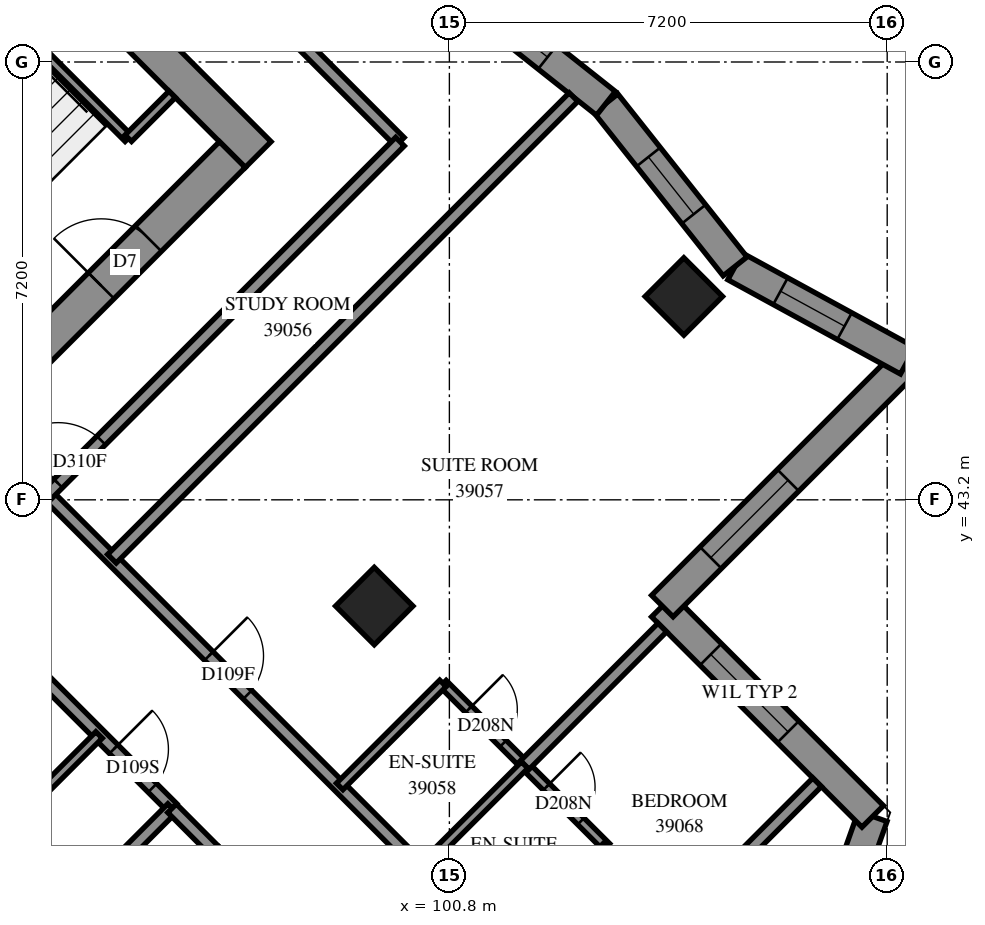
"""IFC4 building model, lengths in metres.
Left out: names, types, materials, properties, quantities, classifications, styles, units other than length and angle.
Written with IfcOpenShell. Run it as: python <this file> out.ifc"""

import sys

from ifc_helpers import new_model, si_unit, direction, frame, frame_2d, origin, origin_2d, place, context, subcontext, project, spatial, polyline, rectangle, outline, extrude, element, fill, save


model = new_model("IFC4")
c1 = context("Model", 3, precision=1e-05, world=origin(), true_north=direction((0.0, 1.0)))
c2 = subcontext(c1, "Body", "Model", "MODEL_VIEW")
j1 = project(units=[si_unit("LENGTHUNIT", "METRE"), si_unit("PLANEANGLEUNIT", "RADIAN")], contexts=[c1])
p1 = place(None, origin())
s1 = spatial("IfcSite", under=j1, at=p1, CompositionType="ELEMENT")
p2 = place(p1, origin())
s2 = spatial("IfcBuilding", under=s1, at=p2, CompositionType="ELEMENT")
p3 = place(p2, frame((0.0, 0.0, 145.6)))
s3 = spatial("IfcBuildingStorey", under=s2, at=p3, CompositionType="ELEMENT", Elevation=145.6)
for number, where, z_axis, x_axis in (
    (1, (104.656, 46.544, 0.0), (0.0, 0.0, 1.0), (0.707, -0.707, 0.0)),
    (2, (99.565, 41.453, 0.0), (0.0, 0.0, 1.0), (0.707, -0.707, 0.0)),
):
    element("IfcColumn", number, at=place(p3, frame(where, z_axis=z_axis, x_axis=x_axis)), inside=s3, PredefinedType="COLUMN", context=c2, shape_type="SweptSolid", body=[
        extrude(rectangle(XDim=0.9, YDim=0.9, at=origin_2d()), origin(), (0.0, 0.0, 1.0), 3.1),
    ])
p4 = place(p3, frame((86.625, 59.908, -0.3), z_axis=(0.0, 0.0, 1.0), x_axis=(0.7071067812, -0.7071067812, 0.0)))
e3 = element("IfcWall", 3, at=p4, inside=s3, PredefinedType="SHEAR", context=c2, shape_type="SweptSolid", body=[
    extrude(rectangle(XDim=15.6, YDim=0.6, at=frame_2d((7.8, 0.0))), origin(), (0.0, 0.0, 1.0), 2.7),
])
p5 = place(p4, frame((10.6, 0.0, 0.3)))
e4 = element("IfcOpeningElement", 4, at=p5, cuts=e3, PredefinedType="OPENING", context=c2, shape_type="SweptSolid", body=[
    extrude(rectangle(XDim=0.8, YDim=2.1, at=frame_2d((0.4, 1.05))), frame((0.0, 0.31, 0.0), z_axis=(0.0, -1.0, 0.0), x_axis=(1.0, 0.0, 0.0)), (0.0, 0.0, 1.0), 0.62),
])
p6 = place(p3, frame((87.049, 38.695, -0.3), z_axis=(0.0, 0.0, 1.0), x_axis=(0.7071067812, 0.7071067812, 0.0)))
e5 = element("IfcWall", 5, at=p6, inside=s3, PredefinedType="SHEAR", context=c2, shape_type="SweptSolid", body=[
    extrude(rectangle(XDim=14.4, YDim=0.6, at=frame_2d((7.2, 0.0))), origin(), (0.0, 0.0, 1.0), 2.7),
])
p7 = place(p6, frame((4.55, 0.0, 0.3)))
e6 = element("IfcOpeningElement", 6, at=p7, cuts=e5, PredefinedType="OPENING", context=c2, shape_type="SweptSolid", body=[
    extrude(rectangle(XDim=1.1, YDim=2.1, at=frame_2d((0.55, 1.05))), frame((0.0, 0.31, 0.0), z_axis=(0.0, -1.0, 0.0), x_axis=(1.0, 0.0, 0.0)), (0.0, 0.0, 1.0), 0.62),
])
p8 = place(p6, frame((11.35, 0.0, 0.3)))
e7 = element("IfcOpeningElement", 7, at=p8, cuts=e5, PredefinedType="OPENING", context=c2, shape_type="SweptSolid", body=[
    extrude(rectangle(XDim=1.1, YDim=2.1, at=frame_2d((0.55, 1.05))), frame((0.0, 0.31, 0.0), z_axis=(0.0, -1.0, 0.0), x_axis=(1.0, 0.0, 0.0)), (0.0, 0.0, 1.0), 0.62),
])
p9 = place(p3, frame((105.98, 32.984, 0.0), z_axis=(0.0, 0.0, 1.0), x_axis=(0.3349755344, 0.9422268259, 0.0)))
e8 = element("IfcWall", 8, at=p9, inside=s3, PredefinedType="SOLIDWALL", context=c2, shape_type="SweptSolid", body=[
    extrude(outline(polyline([(-0.114, -0.25), (5.475, -0.25), (5.16, 0.25), (0.114, 0.25), (-0.114, -0.25)])), origin(), (0.0, 0.0, 1.0), 3.1),
])
p10 = place(p9, frame((1.158, 0.0, 0.45)))
e9 = element("IfcOpeningElement", 9, at=p10, cuts=e8, PredefinedType="OPENING", context=c2, shape_type="SweptSolid", body=[
    extrude(rectangle(XDim=1.2, YDim=2.5, at=frame_2d((0.6, 1.25))), frame((0.0, 0.26, 0.0), z_axis=(0.0, -1.0, 0.0), x_axis=(1.0, 0.0, 0.0)), (0.0, 0.0, 1.0), 0.52),
])
p11 = place(p9, frame((3.48, 0.0, 0.45)))
e10 = element("IfcOpeningElement", 10, at=p11, cuts=e8, PredefinedType="OPENING", context=c2, shape_type="SweptSolid", body=[
    extrude(rectangle(XDim=1.2, YDim=2.5, at=frame_2d((0.6, 1.25))), frame((0.0, 0.26, 0.0), z_axis=(0.0, -1.0, 0.0), x_axis=(1.0, 0.0, 0.0)), (0.0, 0.0, 1.0), 0.52),
])
p12 = place(p3, frame((107.761, 37.994, 0.0), z_axis=(0.0, 0.0, 1.0), x_axis=(-0.7071170016, 0.7070965606, 0.0)))
e11 = element("IfcWall", 11, at=p12, inside=s3, PredefinedType="SOLIDWALL", context=c2, shape_type="SweptSolid", body=[
    extrude(outline(polyline([(-0.158, -0.25), (4.642, -0.25), (5.142, 0.25), (0.158, 0.25), (-0.158, -0.25)])), origin(), (0.0, 0.0, 1.0), 3.1),
])
p13 = place(p12, frame((1.967, 0.0, 0.6)))
e12 = element("IfcOpeningElement", 12, at=p13, cuts=e11, PredefinedType="OPENING", context=c2, shape_type="SweptSolid", body=[
    extrude(rectangle(XDim=1.8, YDim=1.9, at=frame_2d((0.9, 0.95))), frame((0.0, 0.26, 0.0), z_axis=(0.0, -1.0, 0.0), x_axis=(1.0, 0.0, 0.0)), (0.0, 0.0, 1.0), 0.52),
])
p14 = place(p3, frame((104.302, 41.453, 0.0), z_axis=(0.0, 0.0, 1.0), x_axis=(0.7071155421, 0.7070980202, 0.0)))
e13 = element("IfcWall", 13, at=p14, inside=s3, PredefinedType="SOLIDWALL", context=c2, shape_type="SweptSolid", body=[
    extrude(outline(polyline([(0.25, -0.25), (6.041, -0.25), (5.373, 0.25), (-0.25, 0.25), (0.25, -0.25)])), origin(), (0.0, 0.0, 1.0), 3.1),
])
p15 = place(p14, frame((1.125, 0.0, 0.6)))
e14 = element("IfcOpeningElement", 14, at=p15, cuts=e13, PredefinedType="OPENING", context=c2, shape_type="SweptSolid", body=[
    extrude(rectangle(XDim=1.8, YDim=1.9, at=frame_2d((0.9, 0.95))), frame((0.0, 0.26, 0.0), z_axis=(0.0, -1.0, 0.0), x_axis=(1.0, 0.0, 0.0)), (0.0, 0.0, 1.0), 0.52),
])
p16 = place(p3, frame((108.338, 45.489, 0.0), z_axis=(0.0, 0.0, 1.0), x_axis=(-0.8776615504, 0.4792809227, 0.0)))
e15 = element("IfcWall", 15, at=p16, inside=s3, PredefinedType="SOLIDWALL", context=c2, shape_type="SweptSolid", body=[
    extrude(outline(polyline([(-0.334, -0.25), (3.184, -0.25), (3.286, 0.25), (0.334, 0.25), (-0.334, -0.25)])), origin(), (0.0, 0.0, 1.0), 3.1),
])
p17 = place(p16, frame((1.184, 0.0, 0.45)))
e16 = element("IfcOpeningElement", 16, at=p17, cuts=e15, PredefinedType="OPENING", context=c2, shape_type="SweptSolid", body=[
    extrude(rectangle(XDim=1.2, YDim=2.5, at=frame_2d((0.6, 1.25))), frame((0.0, 0.26, 0.0), z_axis=(0.0, -1.0, 0.0), x_axis=(1.0, 0.0, 0.0)), (0.0, 0.0, 1.0), 0.52),
])
p18 = place(p3, frame((105.499, 47.039, 0.0), z_axis=(0.0, 0.0, 1.0), x_axis=(-0.6210369057, 0.7837813227, 0.0)))
e17 = element("IfcWall", 17, at=p18, inside=s3, PredefinedType="SOLIDWALL", context=c2, shape_type="SweptSolid", body=[
    extrude(outline(polyline([(0.051, -0.25), (3.449, -0.25), (3.391, 0.25), (-0.051, 0.25), (0.051, -0.25)])), origin(), (0.0, 0.0, 1.0), 3.1),
])
p19 = place(p18, frame((1.095, 0.0, 0.45)))
e18 = element("IfcOpeningElement", 18, at=p19, cuts=e17, PredefinedType="OPENING", context=c2, shape_type="SweptSolid", body=[
    extrude(rectangle(XDim=1.2, YDim=2.5, at=frame_2d((0.6, 1.25))), frame((0.0, 0.26, 0.0), z_axis=(0.0, -1.0, 0.0), x_axis=(1.0, 0.0, 0.0)), (0.0, 0.0, 1.0), 0.52),
])
p20 = place(p3, frame((103.375, 49.719, 0.0), z_axis=(0.0, 0.0, 1.0), x_axis=(-0.7837772273, 0.6210420742, 0.0)))
e19 = element("IfcWall", 19, at=p20, inside=s3, PredefinedType="SOLIDWALL", context=c2, shape_type="SweptSolid", body=[
    extrude(outline(polyline([(-0.029, -0.25), (3.369, -0.25), (3.427, 0.25), (0.029, 0.25), (-0.029, -0.25)])), origin(), (0.0, 0.0, 1.0), 3.1),
])
p21 = place(p20, frame((1.225, 0.0, 0.45)))
e20 = element("IfcOpeningElement", 20, at=p21, cuts=e19, PredefinedType="OPENING", context=c2, shape_type="SweptSolid", body=[
    extrude(rectangle(XDim=1.2, YDim=2.5, at=frame_2d((0.6, 1.25))), frame((0.0, 0.26, 0.0), z_axis=(0.0, -1.0, 0.0), x_axis=(1.0, 0.0, 0.0)), (0.0, 0.0, 1.0), 0.52),
])
p22 = place(p3, frame((91.313, 53.354, 0.0), z_axis=(0.0, 0.0, 1.0), x_axis=(0.7071067812, -0.7071067812, 0.0)))
e21 = element("IfcWall", 21, at=p22, inside=s3, PredefinedType="PARTITIONING", context=c2, shape_type="SweptSolid", body=[
    extrude(rectangle(XDim=5.95, YDim=0.15, at=frame_2d((2.975, 0.0))), origin(), (0.0, 0.0, 1.0), 3.1),
])
p23 = place(p3, frame((95.52, 49.146, 0.0), z_axis=(0.0, 0.0, 1.0), x_axis=(0.7071067812, 0.7071067812, 0.0)))
e22 = element("IfcWall", 22, at=p23, inside=s3, PredefinedType="PARTITIONING", context=c2, shape_type="SweptSolid", body=[
    extrude(rectangle(XDim=1.02, YDim=0.15, at=frame_2d((0.51, 0.0))), origin(), (0.0, 0.0, 1.0), 3.1),
])
p24 = place(p3, frame((94.189, 43.287, 0.0), z_axis=(0.0, 0.0, 1.0), x_axis=(0.7071067812, -0.7071067812, 0.0)))
e23 = element("IfcWall", 23, at=p24, inside=s3, PredefinedType="PARTITIONING", context=c2, shape_type="SweptSolid", body=[
    extrude(rectangle(XDim=12.298, YDim=0.2, at=frame_2d((6.149, 0.0))), origin(), (0.0, 0.0, 1.0), 3.1),
])
p25 = place(p24, frame((3.755, 0.0, 0.0)))
e24 = element("IfcOpeningElement", 24, at=p25, cuts=e23, PredefinedType="OPENING", context=c2, shape_type="SweptSolid", body=[
    extrude(rectangle(XDim=0.9, YDim=2.1, at=frame_2d((0.45, 1.05))), frame((0.0, 0.11, 0.0), z_axis=(0.0, -1.0, 0.0), x_axis=(1.0, 0.0, 0.0)), (0.0, 0.0, 1.0), 0.22),
])
p26 = place(p24, frame((10.998, 0.0, 0.0)))
e25 = element("IfcOpeningElement", 25, at=p26, cuts=e23, PredefinedType="OPENING", context=c2, shape_type="SweptSolid", body=[
    extrude(rectangle(XDim=0.9, YDim=2.1, at=frame_2d((0.45, 1.05))), frame((0.0, 0.11, 0.0), z_axis=(0.0, -1.0, 0.0), x_axis=(1.0, 0.0, 0.0)), (0.0, 0.0, 1.0), 0.22),
])
p27 = place(p3, frame((91.755, 57.317, 0.0), z_axis=(0.0, 0.0, 1.0), x_axis=(0.7071067812, -0.7071067812, 0.0)))
e26 = element("IfcWall", 26, at=p27, inside=s3, PredefinedType="PARTITIONING", context=c2, shape_type="SweptSolid", body=[
    extrude(rectangle(XDim=11.639, YDim=0.2, at=frame_2d((5.819, 0.0))), origin(), (0.0, 0.0, 1.0), 3.1),
])
p28 = place(p3, frame((95.25, 42.232, 0.0), z_axis=(0.0, 0.0, 1.0), x_axis=(0.7071114386, 0.7071021238, 0.0)))
e27 = element("IfcWall", 27, at=p28, inside=s3, PredefinedType="PARTITIONING", context=c2, shape_type="SweptSolid", body=[
    extrude(rectangle(XDim=10.736, YDim=0.2, at=frame_2d((5.368, 0.0))), origin(), (0.0, 0.0, 1.0), 3.1),
])
p29 = place(p3, frame((94.19, 43.292, 0.0), z_axis=(0.0, 0.0, 1.0), x_axis=(0.7071067812, 0.7071067812, 0.0)))
e28 = element("IfcWall", 28, at=p29, inside=s3, PredefinedType="PARTITIONING", context=c2, shape_type="SweptSolid", body=[
    extrude(rectangle(XDim=8.2, YDim=0.2, at=frame_2d((4.1, 0.0))), origin(), (0.0, 0.0, 1.0), 3.1),
])
p30 = place(p29, frame((0.251, 0.0, 0.0)))
e29 = element("IfcOpeningElement", 29, at=p30, cuts=e28, PredefinedType="OPENING", context=c2, shape_type="SweptSolid", body=[
    extrude(rectangle(XDim=1.0, YDim=2.1, at=frame_2d((0.5, 1.05))), frame((0.0, 0.11, 0.0), z_axis=(0.0, -1.0, 0.0), x_axis=(1.0, 0.0, 0.0)), (0.0, 0.0, 1.0), 0.22),
])
p31 = place(p3, frame((92.639, 41.739, 0.0), z_axis=(0.0, 0.0, 1.0), x_axis=(0.7071067812, -0.7071067812, 0.0)))
e30 = element("IfcWall", 30, at=p31, inside=s3, PredefinedType="PARTITIONING", context=c2, shape_type="SweptSolid", body=[
    extrude(rectangle(XDim=5.1, YDim=0.2, at=frame_2d((2.55, 0.0))), origin(), (0.0, 0.0, 1.0), 3.1),
])
p32 = place(p31, frame((0.123, 0.0, 0.0)))
e31 = element("IfcOpeningElement", 31, at=p32, cuts=e30, PredefinedType="OPENING", context=c2, shape_type="SweptSolid", body=[
    extrude(rectangle(XDim=1.0, YDim=2.1, at=frame_2d((0.5, 1.05))), frame((0.0, 0.11, 0.0), z_axis=(0.0, -1.0, 0.0), x_axis=(1.0, 0.0, 0.0)), (0.0, 0.0, 1.0), 0.22),
])
p33 = place(p31, frame((3.734, 0.0, 0.0)))
e32 = element("IfcOpeningElement", 32, at=p33, cuts=e30, PredefinedType="OPENING", context=c2, shape_type="SweptSolid", body=[
    extrude(rectangle(XDim=0.9, YDim=2.1, at=frame_2d((0.45, 1.05))), frame((0.0, 0.11, 0.0), z_axis=(0.0, -1.0, 0.0), x_axis=(1.0, 0.0, 0.0)), (0.0, 0.0, 1.0), 0.22),
])
p34 = place(p3, frame((100.694, 40.178, 0.0), z_axis=(0.0, 0.0, 1.0), x_axis=(0.7076329021, -0.7065802685, 0.0)))
e33 = element("IfcWall", 33, at=p34, inside=s3, PredefinedType="PARTITIONING", context=c2, shape_type="SweptSolid", body=[
    extrude(rectangle(XDim=3.8, YDim=0.15, at=frame_2d((1.9, 0.0))), origin(), (0.0, 0.0, 1.0), 3.1),
])
p35 = place(p34, frame((0.598, 0.0, 0.0)))
e34 = element("IfcOpeningElement", 34, at=p35, cuts=e33, PredefinedType="OPENING", context=c2, shape_type="SweptSolid", body=[
    extrude(rectangle(XDim=0.8, YDim=2.1, at=frame_2d((0.4, 1.05))), frame((0.0, 0.085, 0.0), z_axis=(0.0, -1.0, 0.0), x_axis=(1.0, 0.0, 0.0)), (0.0, 0.0, 1.0), 0.17),
])
p36 = place(p34, frame((2.405, 0.0, 0.0)))
e35 = element("IfcOpeningElement", 35, at=p36, cuts=e33, PredefinedType="OPENING", context=c2, shape_type="SweptSolid", body=[
    extrude(rectangle(XDim=0.8, YDim=2.1, at=frame_2d((0.4, 1.05))), frame((0.0, 0.085, 0.0), z_axis=(0.0, -1.0, 0.0), x_axis=(1.0, 0.0, 0.0)), (0.0, 0.0, 1.0), 0.17),
])
p37 = place(p3, frame((102.04, 38.838, 0.0), z_axis=(0.0, 0.0, 1.0), x_axis=(0.7071067812, 0.7071067812, 0.0)))
e36 = element("IfcWall", 36, at=p37, inside=s3, PredefinedType="PARTITIONING", context=c2, shape_type="SweptSolid", body=[
    extrude(rectangle(XDim=3.199, YDim=0.2, at=frame_2d((1.599, 0.0))), origin(), (0.0, 0.0, 1.0), 3.1),
])
p38 = place(p3, frame((105.105, 36.813, 0.0), z_axis=(0.0, 0.0, 1.0), x_axis=(0.7071067812, 0.7071067812, 0.0)))
e37 = element("IfcWall", 37, at=p38, inside=s3, PredefinedType="PARTITIONING", context=c2, shape_type="SweptSolid", body=[
    extrude(rectangle(XDim=2.463, YDim=0.2, at=frame_2d((1.232, 0.0))), origin(), (0.0, 0.0, 1.0), 3.1),
])
for number, where, z_axis, x_axis in (
    (38, (93.341, 37.635, 0.0), (0.0, 0.0, 1.0), (0.707, 0.707, 0.0)),
    (39, (101.685, 35.797, 0.0), (0.0, 0.0, 1.0), (0.707, 0.707, 0.0)),
):
    element("IfcWall", number, at=place(p3, frame(where, z_axis=z_axis, x_axis=x_axis)), inside=s3, PredefinedType="PARTITIONING", context=c2, shape_type="SweptSolid", body=[
        extrude(rectangle(XDim=2.401, YDim=0.15, at=frame_2d((1.201, 0.0))), origin(), (0.0, 0.0, 1.0), 3.1),
    ])
for number, where, z_axis, x_axis in (
    (40, (100.34, 37.142, 0.0), (0.0, 0.0, 1.0), (0.708, 0.707, 0.0)),
    (41, (98.996, 38.486, 0.0), (0.0, 0.0, 1.0), (0.708, 0.707, 0.0)),
):
    element("IfcWall", number, at=place(p3, frame(where, z_axis=z_axis, x_axis=x_axis)), inside=s3, PredefinedType="PARTITIONING", context=c2, shape_type="SweptSolid", body=[
        extrude(rectangle(XDim=2.4, YDim=0.15, at=frame_2d((1.2, 0.0))), origin(), (0.0, 0.0, 1.0), 3.1),
    ])
p39 = place(p3, frame((94.923, 36.813, 0.0), z_axis=(0.0, 0.0, 1.0), x_axis=(0.7071067812, 0.7071067812, 0.0)))
e42 = element("IfcWall", 42, at=p39, inside=s3, PredefinedType="PARTITIONING", context=c2, shape_type="SweptSolid", body=[
    extrude(rectangle(XDim=1.864, YDim=0.2, at=frame_2d((0.932, 0.0))), origin(), (0.0, 0.0, 1.0), 3.1),
])
p40 = place(p3, frame((96.24, 38.128, 0.0), z_axis=(0.0, 0.0, 1.0), x_axis=(0.7061059238, -0.7081062239, 0.0)))
e43 = element("IfcWall", 43, at=p40, inside=s3, PredefinedType="PARTITIONING", context=c2, shape_type="SweptSolid", body=[
    extrude(rectangle(XDim=1.0, YDim=0.2, at=frame_2d((0.5, 0.0))), origin(), (0.0, 0.0, 1.0), 3.1),
])
p41 = place(p13, origin())
e44 = element("IfcWindow", 44, at=p41, inside=s3, PartitioningType="SINGLE_PANEL", PredefinedType="WINDOW", context=c2, shape_type="SweptSolid", body=[
    extrude(rectangle(XDim=1.8, YDim=1.9, at=frame_2d((0.9, 0.95))), frame((0.0, 0.18, 0.0), z_axis=(0.0, -1.0, 0.0), x_axis=(1.0, 0.0, 0.0)), (0.0, 0.0, 1.0), 0.06),
])
fill(e12, e44)
p42 = place(p15, origin())
e45 = element("IfcWindow", 45, at=p42, inside=s3, PartitioningType="SINGLE_PANEL", PredefinedType="WINDOW", context=c2, shape_type="SweptSolid", body=[
    extrude(rectangle(XDim=1.8, YDim=1.9, at=frame_2d((0.9, 0.95))), frame((0.0, 0.18, 0.0), z_axis=(0.0, -1.0, 0.0), x_axis=(1.0, 0.0, 0.0)), (0.0, 0.0, 1.0), 0.06),
])
fill(e14, e45)
p43 = place(p17, origin())
e46 = element("IfcWindow", 46, at=p43, inside=s3, PartitioningType="SINGLE_PANEL", PredefinedType="WINDOW", context=c2, shape_type="SweptSolid", body=[
    extrude(rectangle(XDim=1.2, YDim=2.5, at=frame_2d((0.6, 1.25))), frame((0.0, 0.18, 0.0), z_axis=(0.0, -1.0, 0.0), x_axis=(1.0, 0.0, 0.0)), (0.0, 0.0, 1.0), 0.06),
])
fill(e16, e46)
p44 = place(p19, origin())
e47 = element("IfcWindow", 47, at=p44, inside=s3, PartitioningType="SINGLE_PANEL", PredefinedType="WINDOW", context=c2, shape_type="SweptSolid", body=[
    extrude(rectangle(XDim=1.2, YDim=2.5, at=frame_2d((0.6, 1.25))), frame((0.0, 0.18, 0.0), z_axis=(0.0, -1.0, 0.0), x_axis=(1.0, 0.0, 0.0)), (0.0, 0.0, 1.0), 0.06),
])
fill(e18, e47)
p45 = place(p21, origin())
e48 = element("IfcWindow", 48, at=p45, inside=s3, PartitioningType="SINGLE_PANEL", PredefinedType="WINDOW", context=c2, shape_type="SweptSolid", body=[
    extrude(rectangle(XDim=1.2, YDim=2.5, at=frame_2d((0.6, 1.25))), frame((0.0, 0.18, 0.0), z_axis=(0.0, -1.0, 0.0), x_axis=(1.0, 0.0, 0.0)), (0.0, 0.0, 1.0), 0.06),
])
fill(e20, e48)
p46 = place(p8, origin())
e49 = element("IfcDoor", 49, at=p46, inside=s3, OperationType="SINGLE_SWING_RIGHT", PredefinedType="DOOR", context=c2, shape_type="SweptSolid", body=[
    extrude(rectangle(XDim=1.1, YDim=2.1, at=frame_2d((0.55, 1.05))), frame((0.0, 0.025, 0.0), z_axis=(0.0, -1.0, 0.0), x_axis=(1.0, 0.0, 0.0)), (0.0, 0.0, 1.0), 0.05),
])
fill(e7, e49)
p47 = place(p30, origin())
e50 = element("IfcDoor", 50, at=p47, inside=s3, OperationType="SINGLE_SWING_RIGHT", PredefinedType="DOOR", context=c2, shape_type="SweptSolid", body=[
    extrude(rectangle(XDim=1.0, YDim=2.1, at=frame_2d((0.5, 1.05))), frame((0.0, 0.025, 0.0), z_axis=(0.0, -1.0, 0.0), x_axis=(1.0, 0.0, 0.0)), (0.0, 0.0, 1.0), 0.05),
])
fill(e29, e50)
p48 = place(p25, origin())
e51 = element("IfcDoor", 51, at=p48, inside=s3, OperationType="SINGLE_SWING_RIGHT", PredefinedType="DOOR", context=c2, shape_type="SweptSolid", body=[
    extrude(rectangle(XDim=0.9, YDim=2.1, at=frame_2d((0.45, 1.05))), frame((0.0, 0.025, 0.0), z_axis=(0.0, -1.0, 0.0), x_axis=(1.0, 0.0, 0.0)), (0.0, 0.0, 1.0), 0.05),
])
fill(e24, e51)
p49 = place(p35, origin())
e52 = element("IfcDoor", 52, at=p49, inside=s3, OperationType="SINGLE_SWING_RIGHT", PredefinedType="DOOR", context=c2, shape_type="SweptSolid", body=[
    extrude(rectangle(XDim=0.8, YDim=2.1, at=frame_2d((0.4, 1.05))), frame((0.0, 0.025, 0.0), z_axis=(0.0, -1.0, 0.0), x_axis=(1.0, 0.0, 0.0)), (0.0, 0.0, 1.0), 0.05),
])
fill(e34, e52)
p50 = place(p33, origin())
e53 = element("IfcDoor", 53, at=p50, inside=s3, OperationType="SINGLE_SWING_LEFT", PredefinedType="DOOR", context=c2, shape_type="SweptSolid", body=[
    extrude(rectangle(XDim=0.9, YDim=2.1, at=frame_2d((0.45, 1.05))), frame((0.0, 0.025, 0.0), z_axis=(0.0, -1.0, 0.0), x_axis=(1.0, 0.0, 0.0)), (0.0, 0.0, 1.0), 0.05),
])
fill(e32, e53)
p51 = place(p36, origin())
e54 = element("IfcDoor", 54, at=p51, inside=s3, OperationType="SINGLE_SWING_RIGHT", PredefinedType="DOOR", context=c2, shape_type="SweptSolid", body=[
    extrude(rectangle(XDim=0.8, YDim=2.1, at=frame_2d((0.4, 1.05))), frame((0.0, 0.025, 0.0), z_axis=(0.0, -1.0, 0.0), x_axis=(1.0, 0.0, 0.0)), (0.0, 0.0, 1.0), 0.05),
])
fill(e35, e54)
save(model, sys.argv[1])
